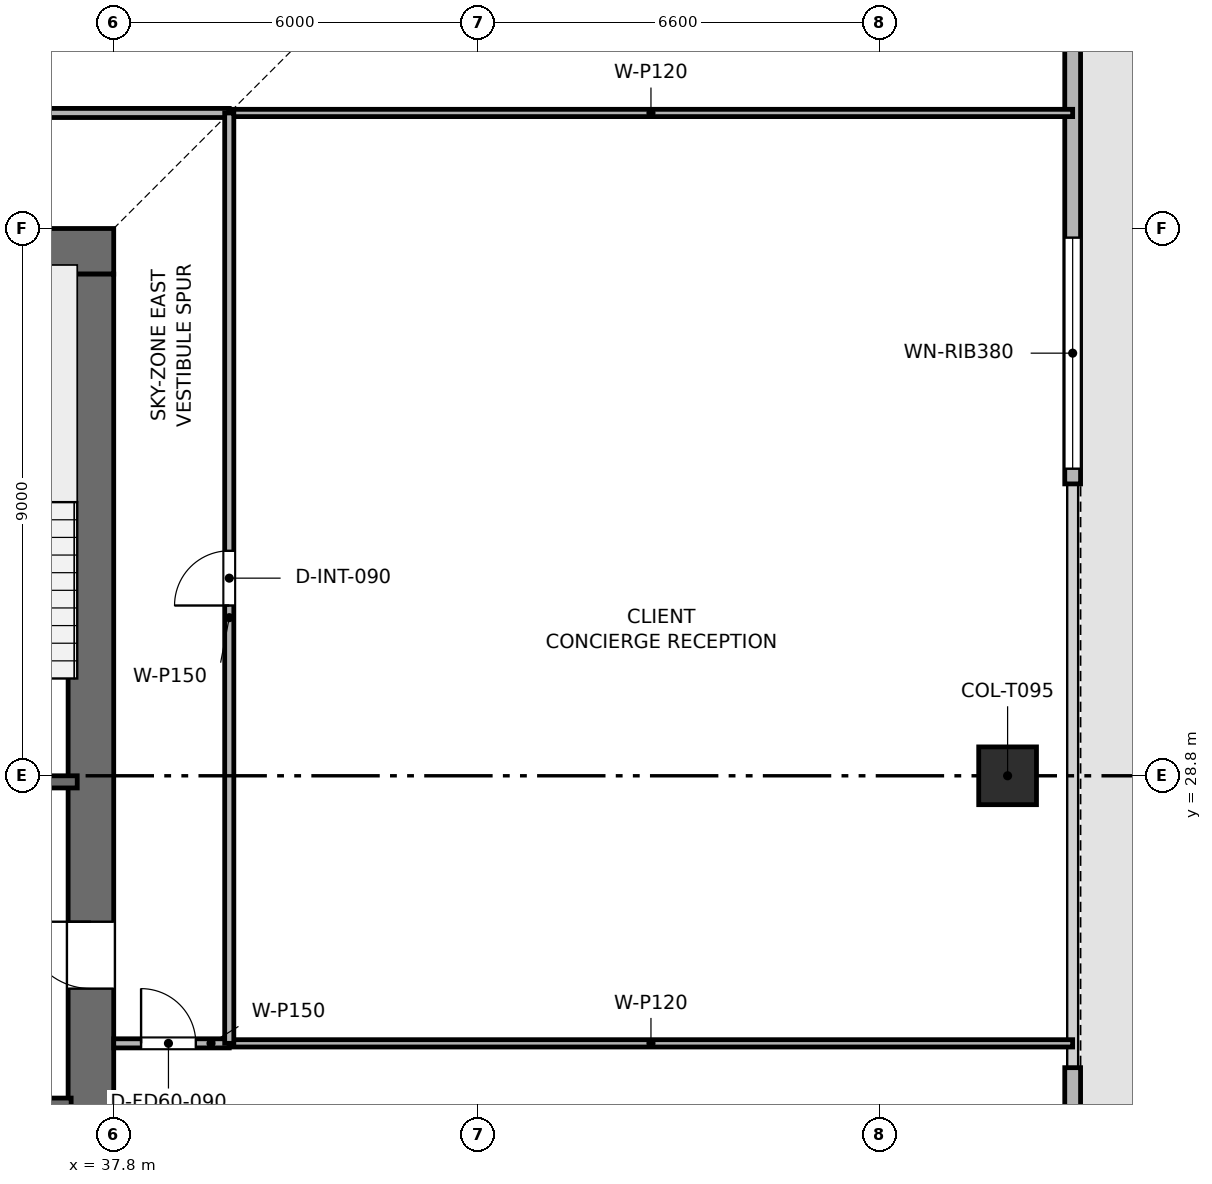
"""IFC4 building model, lengths in metres.
Left out: names, types, materials, properties, quantities, classifications, styles, units other than length and angle.
Written with IfcOpenShell. Run it as: python <this file> out.ifc"""

import sys

from ifc_helpers import new_model, si_unit, direction, frame, frame_2d, origin, origin_2d, place, context, subcontext, project, spatial, rectangle, extrude, element, fill, save


model = new_model("IFC4")
c1 = context("Model", 3, precision=1e-05, world=origin(), true_north=direction((0.0, 1.0)))
c2 = subcontext(c1, "Body", "Model", "MODEL_VIEW")
j1 = project(units=[si_unit("LENGTHUNIT", "METRE"), si_unit("PLANEANGLEUNIT", "RADIAN")], contexts=[c1])
p1 = place(None, origin())
s1 = spatial("IfcSite", under=j1, at=p1, CompositionType="ELEMENT")
p2 = place(p1, origin())
s2 = spatial("IfcBuilding", under=s1, at=p2, CompositionType="ELEMENT")
p3 = place(p2, frame((0.0, 0.0, 246.6)))
s3 = spatial("IfcBuildingStorey", under=s2, at=p3, CompositionType="ELEMENT", Elevation=246.6)
p4 = place(p3, frame((19.8, 37.425, 0.0), z_axis=(0.0, 0.0, 1.0), x_axis=(1.0, 0.0, 0.0)))
e1 = element("IfcWall", 1, at=p4, inside=s3, PredefinedType="SHEAR", context=c2, shape_type="SweptSolid", body=[
    extrude(rectangle(XDim=18.0, YDim=0.75, at=frame_2d((9.0, 0.0))), origin(), (0.0, 0.0, 1.0), 3.75),
])
p5 = place(p4, frame((7.05, 0.0, 0.0)))
e2 = element("IfcOpeningElement", 2, at=p5, cuts=e1, PredefinedType="OPENING", context=c2, shape_type="SweptSolid", body=[
    extrude(rectangle(XDim=1.1, YDim=2.15, at=frame_2d((0.55, 1.075))), frame((0.0, 0.385, 0.0), z_axis=(0.0, -1.0, 0.0), x_axis=(1.0, 0.0, 0.0)), (0.0, 0.0, 1.0), 0.77),
])
p6 = place(p3, frame((37.425, 20.55, 0.0), z_axis=(0.0, 0.0, 1.0), x_axis=(0.0, 1.0, 0.0)))
e3 = element("IfcWall", 3, at=p6, inside=s3, PredefinedType="SHEAR", context=c2, shape_type="SweptSolid", body=[
    extrude(rectangle(XDim=16.5, YDim=0.75, at=frame_2d((8.25, 0.0))), origin(), (0.0, 0.0, 1.0), 3.75),
])
p7 = place(p6, frame((4.75, 0.0, 0.0)))
e4 = element("IfcOpeningElement", 4, at=p7, cuts=e3, PredefinedType="OPENING", context=c2, shape_type="SweptSolid", body=[
    extrude(rectangle(XDim=1.1, YDim=2.15, at=frame_2d((0.55, 1.075))), frame((0.0, 0.385, 0.0), z_axis=(0.0, -1.0, 0.0), x_axis=(1.0, 0.0, 0.0)), (0.0, 0.0, 1.0), 0.77),
])
p8 = place(p3, frame((52.5, 28.8, 0.003), z_axis=(0.0, 0.0, 1.0), x_axis=(1.0, 0.0, 0.0)))
e5 = element("IfcColumn", 5, at=p8, inside=s3, PredefinedType="COLUMN", context=c2, shape_type="SweptSolid", body=[
    extrude(rectangle(XDim=0.95, YDim=0.95, at=origin_2d()), origin(), (0.0, 0.0, 1.0), 3.494),
])
p9 = place(p3, frame((53.57, 46.8, 0.0), z_axis=(0.0, 0.0, 1.0), x_axis=(0.0, -1.0, 0.0)))
e6 = element("IfcWall", 6, at=p9, inside=s3, PredefinedType="SOLIDWALL", context=c2, shape_type="SweptSolid", body=[
    extrude(rectangle(XDim=13.2, YDim=0.26, at=frame_2d((6.6, 0.0))), origin(), (0.0, 0.0, 1.0), 3.5),
])
p10 = place(p9, frame((9.15, 0.0, 0.9)))
e7 = element("IfcOpeningElement", 7, at=p10, cuts=e6, PredefinedType="OPENING", context=c2, shape_type="SweptSolid", body=[
    extrude(rectangle(XDim=3.8, YDim=1.9, at=frame_2d((1.9, 0.95))), frame((0.0, 0.14, 0.0), z_axis=(0.0, -1.0, 0.0), x_axis=(1.0, 0.0, 0.0)), (0.0, 0.0, 1.0), 0.28),
])
p11 = place(p3, frame((53.57, 24.0, 0.0), z_axis=(0.0, 0.0, 1.0), x_axis=(0.0, -1.0, 0.0)))
e8 = element("IfcWall", 8, at=p11, inside=s3, PredefinedType="SOLIDWALL", context=c2, shape_type="SweptSolid", body=[
    extrude(rectangle(XDim=13.2, YDim=0.26, at=frame_2d((6.6, 0.0))), origin(), (0.0, 0.0, 1.0), 3.5),
])
p12 = place(p11, frame((11.75, 0.0, 0.9)))
e9 = element("IfcOpeningElement", 9, at=p12, cuts=e8, PredefinedType="OPENING", context=c2, shape_type="SweptSolid", body=[
    extrude(rectangle(XDim=1.2, YDim=2.1, at=frame_2d((0.6, 1.05))), frame((0.0, 0.14, 0.0), z_axis=(0.0, -1.0, 0.0), x_axis=(1.0, 0.0, 0.0)), (0.0, 0.0, 1.0), 0.28),
])
p13 = place(p3, frame((34.05, 28.7, 0.0), z_axis=(0.0, 0.0, 1.0), x_axis=(1.0, 0.0, 0.0)))
e10 = element("IfcWall", 10, at=p13, inside=s3, PredefinedType="SHEAR", context=c2, shape_type="SweptSolid", body=[
    extrude(rectangle(XDim=3.15, YDim=0.2, at=frame_2d((1.575, 0.0))), origin(), (0.0, 0.0, 1.0), 3.5),
])
p14 = place(p13, frame((0.8, 0.0, 0.0)))
e11 = element("IfcOpeningElement", 11, at=p14, cuts=e10, PredefinedType="OPENING", context=c2, shape_type="SweptSolid", body=[
    extrude(rectangle(XDim=1.0, YDim=2.1, at=frame_2d((0.5, 1.05))), frame((0.0, 0.11, 0.0), z_axis=(0.0, -1.0, 0.0), x_axis=(1.0, 0.0, 0.0)), (0.0, 0.0, 1.0), 0.22),
])
p15 = place(p3, frame((34.05, 23.4, 0.0), z_axis=(0.0, 0.0, 1.0), x_axis=(1.0, 0.0, 0.0)))
e12 = element("IfcWall", 12, at=p15, inside=s3, PredefinedType="SHEAR", context=c2, shape_type="SweptSolid", body=[
    extrude(rectangle(XDim=3.05, YDim=0.2, at=frame_2d((1.525, 0.0))), origin(), (0.0, 0.0, 1.0), 3.5),
])
p16 = place(p15, frame((1.2, 0.0, 0.0)))
e13 = element("IfcOpeningElement", 13, at=p16, cuts=e12, PredefinedType="OPENING", context=c2, shape_type="SweptSolid", body=[
    extrude(rectangle(XDim=1.1, YDim=2.15, at=frame_2d((0.55, 1.075))), frame((0.0, 0.11, 0.0), z_axis=(0.0, -1.0, 0.0), x_axis=(1.0, 0.0, 0.0)), (0.0, 0.0, 1.0), 0.22),
])
p17 = place(p3, frame((37.8, 24.4, 0.0), z_axis=(0.0, 0.0, 1.0), x_axis=(1.0, 0.0, 0.0)))
e14 = element("IfcWall", 14, at=p17, inside=s3, PredefinedType="PARTITIONING", context=c2, shape_type="SweptSolid", body=[
    extrude(rectangle(XDim=1.9, YDim=0.15, at=frame_2d((0.95, 0.0))), origin(), (0.0, 0.0, 1.0), 3.5),
])
p18 = place(p17, frame((0.45, 0.0, 0.0)))
e15 = element("IfcOpeningElement", 15, at=p18, cuts=e14, PredefinedType="OPENING", context=c2, shape_type="SweptSolid", body=[
    extrude(rectangle(XDim=0.9, YDim=2.1, at=frame_2d((0.45, 1.05))), frame((0.0, 0.085, 0.0), z_axis=(0.0, -1.0, 0.0), x_axis=(1.0, 0.0, 0.0)), (0.0, 0.0, 1.0), 0.17),
])
for number, where, z_axis, x_axis in (
    (16, (39.7, 24.4, 0.0), (0.0, 0.0, 1.0), (1.0, 0.0, 0.0)),
    (17, (39.7, 39.7, 0.0), (0.0, 0.0, 1.0), (1.0, 0.0, 0.0)),
):
    element("IfcWall", number, at=place(p3, frame(where, z_axis=z_axis, x_axis=x_axis)), inside=s3, PredefinedType="PARTITIONING", context=c2, shape_type="SweptSolid", body=[
        extrude(rectangle(XDim=13.87, YDim=0.12, at=frame_2d((6.935, 0.0))), origin(), (0.0, 0.0, 1.0), 3.085),
    ])
p19 = place(p3, frame((17.9, 39.7, 0.0), z_axis=(0.0, 0.0, 1.0), x_axis=(1.0, 0.0, 0.0)))
e18 = element("IfcWall", 18, at=p19, inside=s3, PredefinedType="PARTITIONING", context=c2, shape_type="SweptSolid", body=[
    extrude(rectangle(XDim=21.8, YDim=0.15, at=frame_2d((10.9, 0.0))), origin(), (0.0, 0.0, 1.0), 3.085),
])
p20 = place(p19, frame((10.45, 0.0, 0.0)))
e19 = element("IfcOpeningElement", 19, at=p20, cuts=e18, PredefinedType="OPENING", context=c2, shape_type="SweptSolid", body=[
    extrude(rectangle(XDim=0.9, YDim=2.1, at=frame_2d((0.45, 1.05))), frame((0.0, 0.085, 0.0), z_axis=(0.0, -1.0, 0.0), x_axis=(1.0, 0.0, 0.0)), (0.0, 0.0, 1.0), 0.17),
])
p21 = place(p3, frame((39.7, 24.4, 0.0), z_axis=(0.0, 0.0, 1.0), x_axis=(0.0, 1.0, 0.0)))
e20 = element("IfcWall", 20, at=p21, inside=s3, PredefinedType="PARTITIONING", context=c2, shape_type="SweptSolid", body=[
    extrude(rectangle(XDim=15.3, YDim=0.15, at=frame_2d((7.65, 0.0))), origin(), (0.0, 0.0, 1.0), 3.085),
])
p22 = place(p21, frame((7.2, 0.0, 0.0)))
e21 = element("IfcOpeningElement", 21, at=p22, cuts=e20, PredefinedType="OPENING", context=c2, shape_type="SweptSolid", body=[
    extrude(rectangle(XDim=0.9, YDim=2.1, at=frame_2d((0.45, 1.05))), frame((0.0, 0.085, 0.0), z_axis=(0.0, -1.0, 0.0), x_axis=(1.0, 0.0, 0.0)), (0.0, 0.0, 1.0), 0.17),
])
p23 = place(p10, origin())
e22 = element("IfcWindow", 22, at=p23, inside=s3, PartitioningType="SINGLE_PANEL", PredefinedType="WINDOW", context=c2, shape_type="SweptSolid", body=[
    extrude(rectangle(XDim=3.8, YDim=1.9, at=frame_2d((1.9, 0.95))), frame((0.0, 0.03, 0.0), z_axis=(0.0, -1.0, 0.0), x_axis=(1.0, 0.0, 0.0)), (0.0, 0.0, 1.0), 0.06),
])
fill(e7, e22)
p24 = place(p18, origin())
e23 = element("IfcDoor", 23, at=p24, inside=s3, OperationType="SINGLE_SWING_LEFT", PredefinedType="DOOR", context=c2, shape_type="SweptSolid", body=[
    extrude(rectangle(XDim=0.9, YDim=2.1, at=frame_2d((0.45, 1.05))), frame((0.0, 0.025, 0.0), z_axis=(0.0, -1.0, 0.0), x_axis=(1.0, 0.0, 0.0)), (0.0, 0.0, 1.0), 0.05),
])
fill(e15, e23)
p25 = place(p22, origin())
e24 = element("IfcDoor", 24, at=p25, inside=s3, OperationType="SINGLE_SWING_LEFT", PredefinedType="DOOR", context=c2, shape_type="SweptSolid", body=[
    extrude(rectangle(XDim=0.9, YDim=2.1, at=frame_2d((0.45, 1.05))), frame((0.0, 0.025, 0.0), z_axis=(0.0, -1.0, 0.0), x_axis=(1.0, 0.0, 0.0)), (0.0, 0.0, 1.0), 0.05),
])
fill(e21, e24)
p26 = place(p7, origin())
e25 = element("IfcDoor", 25, at=p26, inside=s3, OperationType="SINGLE_SWING_RIGHT", PredefinedType="DOOR", context=c2, shape_type="SweptSolid", body=[
    extrude(rectangle(XDim=1.1, YDim=2.15, at=frame_2d((0.55, 1.075))), frame((0.0, 0.025, 0.0), z_axis=(0.0, -1.0, 0.0), x_axis=(1.0, 0.0, 0.0)), (0.0, 0.0, 1.0), 0.05),
])
fill(e4, e25)
save(model, sys.argv[1])
